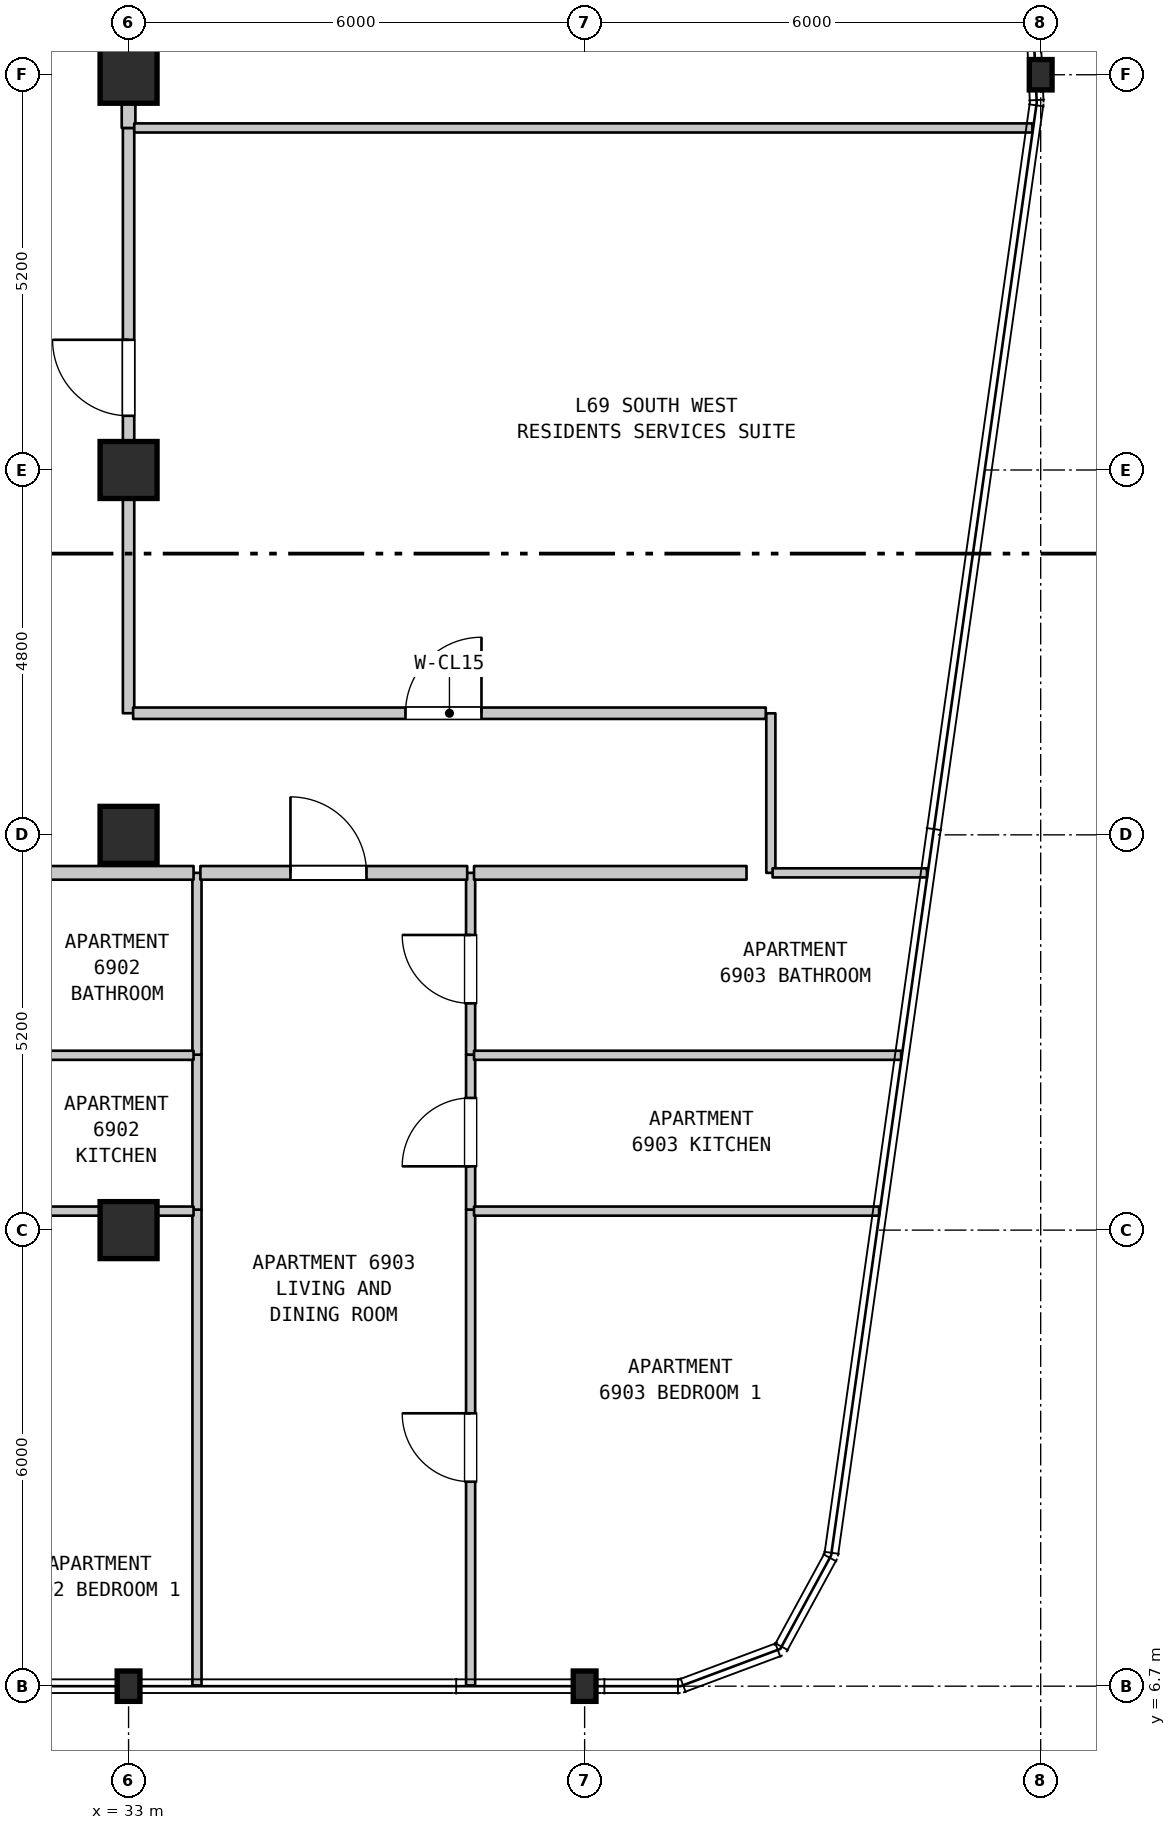
"""IFC4 building model, lengths in metres.
Left out: names, types, materials, properties, quantities, classifications, styles, units other than length and angle.
Written with IfcOpenShell. Run it as: python <this file> out.ifc"""

import sys

from ifc_helpers import new_model, si_unit, direction, frame, frame_2d, origin, origin_2d, place, context, subcontext, project, spatial, rectangle, i_section, extrude, element, fill, save


model = new_model("IFC4")
c1 = context("Model", 3, precision=1e-05, world=origin(), true_north=direction((0.0, 1.0)))
c2 = subcontext(c1, "Body", "Model", "MODEL_VIEW")
j1 = project(units=[si_unit("LENGTHUNIT", "METRE"), si_unit("PLANEANGLEUNIT", "RADIAN")], contexts=[c1])
p1 = place(None, origin())
s1 = spatial("IfcSite", under=j1, at=p1, CompositionType="ELEMENT")
p2 = place(p1, origin())
s2 = spatial("IfcBuilding", under=s1, at=p2, CompositionType="ELEMENT")
p3 = place(p2, frame((0.0, 0.0, 276.9)))
s3 = spatial("IfcBuildingStorey", under=s2, at=p3, CompositionType="ELEMENT", Elevation=276.9)
p4 = place(p3, frame((33.0, 6.7, 0.0), z_axis=(0.0, 0.0, 1.0), x_axis=(1.0, 0.0, 0.0)))
e1 = element("IfcColumn", 1, at=p4, inside=s3, PredefinedType="COLUMN", context=c2, shape_type="SweptSolid", body=[
    extrude(i_section(OverallWidth=0.3, OverallDepth=0.4, WebThickness=0.013, FlangeThickness=0.024, FilletRadius=0.027, at=origin_2d()), origin(), (0.0, 0.0, 1.0), 3.7),
])
for number, where, z_axis, x_axis in (
    (2, (33.0, 12.7, 0.0), (0.0, 0.0, 1.0), (1.0, 0.0, 0.0)),
    (3, (33.0, 17.9, 0.0), (0.0, 0.0, 1.0), (1.0, 0.0, 0.0)),
    (4, (33.0, 22.7, 0.0), (0.0, 0.0, 1.0), (1.0, 0.0, 0.0)),
    (5, (33.0, 27.9, 0.0), (0.0, 0.0, 1.0), (1.0, 0.0, 0.0)),
):
    element("IfcColumn", number, at=place(p3, frame(where, z_axis=z_axis, x_axis=x_axis)), inside=s3, PredefinedType="COLUMN", context=c2, shape_type="SweptSolid", body=[
        extrude(rectangle(XDim=0.75, YDim=0.75, at=origin_2d()), origin(), (0.0, 0.0, 1.0), 3.7),
    ])
for number, where, z_axis, x_axis in (
    (6, (39.0, 6.7, 0.0), (0.0, 0.0, 1.0), (1.0, 0.0, 0.0)),
    (7, (45.0, 27.9, 0.0), (0.0, 0.0, 1.0), (1.0, 0.0, 0.0)),
):
    element("IfcColumn", number, at=place(p3, frame(where, z_axis=z_axis, x_axis=x_axis)), inside=s3, PredefinedType="COLUMN", context=c2, shape_type="SweptSolid", body=[
        extrude(i_section(OverallWidth=0.3, OverallDepth=0.4, WebThickness=0.013, FlangeThickness=0.024, FilletRadius=0.027, at=origin_2d()), origin(), (0.0, 0.0, 1.0), 3.7),
    ])
p5 = place(p3, frame((33.0, 19.5, 0.0), z_axis=(0.0, 0.0, 1.0), x_axis=(0.0, 1.0, 0.0)))
e8 = element("IfcWall", 8, at=p5, inside=s3, PredefinedType="STANDARD", context=c2, shape_type="SweptSolid", body=[
    extrude(rectangle(XDim=7.7, YDim=0.15, at=frame_2d((3.85, 0.0))), origin(), (0.0, 0.0, 1.0), 3.1),
])
p6 = place(p5, frame((3.913, 0.0, 0.0)))
e9 = element("IfcOpeningElement", 9, at=p6, cuts=e8, PredefinedType="OPENING", context=c2, shape_type="SweptSolid", body=[
    extrude(rectangle(XDim=1.0, YDim=2.15, at=frame_2d((0.5, 1.075))), frame((0.0, 0.085, 0.0), z_axis=(0.0, -1.0, 0.0), x_axis=(1.0, 0.0, 0.0)), (0.0, 0.0, 1.0), 0.17),
])
p7 = place(p3, frame((33.0, 27.2, 0.0), z_axis=(0.0, 0.0, 1.0), x_axis=(0.0, 1.0, 0.0)))
e10 = element("IfcWall", 10, at=p7, inside=s3, PredefinedType="STANDARD", context=c2, shape_type="SweptSolid", body=[
    extrude(rectangle(XDim=0.7, YDim=0.18, at=frame_2d((0.35, 0.0))), origin(), (0.0, 0.0, 1.0), 3.1),
])
p8 = place(p3, frame((33.9, 6.71, 0.0), z_axis=(0.0, 0.0, 1.0), x_axis=(0.0, 1.0, 0.0)))
e11 = element("IfcWall", 11, at=p8, inside=s3, PredefinedType="PARTITIONING", context=c2, shape_type="SweptSolid", body=[
    extrude(rectangle(XDim=6.26, YDim=0.12, at=frame_2d((3.13, 0.0))), origin(), (0.0, 0.0, 1.0), 3.39),
])
p9 = place(p3, frame((33.9, 12.97, 0.0), z_axis=(0.0, 0.0, 1.0), x_axis=(0.0, 1.0, 0.0)))
e12 = element("IfcWall", 12, at=p9, inside=s3, PredefinedType="PARTITIONING", context=c2, shape_type="SweptSolid", body=[
    extrude(rectangle(XDim=2.038, YDim=0.12, at=frame_2d((1.019, 0.0))), origin(), (0.0, 0.0, 1.0), 3.39),
])
p10 = place(p3, frame((33.9, 15.008, 0.0), z_axis=(0.0, 0.0, 1.0), x_axis=(0.0, 1.0, 0.0)))
e13 = element("IfcWall", 13, at=p10, inside=s3, PredefinedType="PARTITIONING", context=c2, shape_type="SweptSolid", body=[
    extrude(rectangle(XDim=2.392, YDim=0.12, at=frame_2d((1.196, 0.0))), origin(), (0.0, 0.0, 1.0), 3.39),
])
p11 = place(p3, frame((37.5, 6.71, 0.0), z_axis=(0.0, 0.0, 1.0), x_axis=(0.0, 1.0, 0.0)))
e14 = element("IfcWall", 14, at=p11, inside=s3, PredefinedType="PARTITIONING", context=c2, shape_type="SweptSolid", body=[
    extrude(rectangle(XDim=6.26, YDim=0.12, at=frame_2d((3.13, 0.0))), origin(), (0.0, 0.0, 1.0), 3.39),
])
p12 = place(p11, frame((2.68, 0.0, 0.0)))
e15 = element("IfcOpeningElement", 15, at=p12, cuts=e14, PredefinedType="OPENING", context=c2, shape_type="SweptSolid", body=[
    extrude(rectangle(XDim=0.9, YDim=2.15, at=frame_2d((0.45, 1.075))), frame((0.0, 0.07, 0.0), z_axis=(0.0, -1.0, 0.0), x_axis=(1.0, 0.0, 0.0)), (0.0, 0.0, 1.0), 0.14),
])
p13 = place(p3, frame((37.5, 12.97, 0.0), z_axis=(0.0, 0.0, 1.0), x_axis=(0.0, 1.0, 0.0)))
e16 = element("IfcWall", 16, at=p13, inside=s3, PredefinedType="PARTITIONING", context=c2, shape_type="SweptSolid", body=[
    extrude(rectangle(XDim=2.038, YDim=0.12, at=frame_2d((1.019, 0.0))), origin(), (0.0, 0.0, 1.0), 3.39),
])
p14 = place(p13, frame((0.569, 0.0, 0.0)))
e17 = element("IfcOpeningElement", 17, at=p14, cuts=e16, PredefinedType="OPENING", context=c2, shape_type="SweptSolid", body=[
    extrude(rectangle(XDim=0.9, YDim=2.15, at=frame_2d((0.45, 1.075))), frame((0.0, 0.07, 0.0), z_axis=(0.0, -1.0, 0.0), x_axis=(1.0, 0.0, 0.0)), (0.0, 0.0, 1.0), 0.14),
])
p15 = place(p3, frame((37.5, 15.008, 0.0), z_axis=(0.0, 0.0, 1.0), x_axis=(0.0, 1.0, 0.0)))
e18 = element("IfcWall", 18, at=p15, inside=s3, PredefinedType="PARTITIONING", context=c2, shape_type="SweptSolid", body=[
    extrude(rectangle(XDim=2.392, YDim=0.12, at=frame_2d((1.196, 0.0))), origin(), (0.0, 0.0, 1.0), 3.39),
])
p16 = place(p15, frame((0.675, 0.0, 0.0)))
e19 = element("IfcOpeningElement", 19, at=p16, cuts=e18, PredefinedType="OPENING", context=c2, shape_type="SweptSolid", body=[
    extrude(rectangle(XDim=0.9, YDim=2.1, at=frame_2d((0.45, 1.05))), frame((0.0, 0.07, 0.0), z_axis=(0.0, -1.0, 0.0), x_axis=(1.0, 0.0, 0.0)), (0.0, 0.0, 1.0), 0.14),
])
p17 = place(p3, frame((41.45, 17.4, 0.0), z_axis=(0.0, 0.0, 1.0), x_axis=(0.0, 1.0, 0.0)))
e20 = element("IfcWall", 20, at=p17, inside=s3, PredefinedType="PARTITIONING", context=c2, shape_type="SweptSolid", body=[
    extrude(rectangle(XDim=2.099, YDim=0.12, at=frame_2d((1.05, 0.0))), origin(), (0.0, 0.0, 1.0), 3.39),
])
p18 = place(p3, frame((31.245, 12.95, 0.0), z_axis=(0.0, 0.0, 1.0), x_axis=(1.0, 0.0, 0.0)))
e21 = element("IfcWall", 21, at=p18, inside=s3, PredefinedType="PARTITIONING", context=c2, shape_type="SweptSolid", body=[
    extrude(rectangle(XDim=2.61, YDim=0.12, at=frame_2d((1.305, 0.0))), origin(), (0.0, 0.0, 1.0), 3.39),
])
p19 = place(p3, frame((37.545, 12.95, 0.0), z_axis=(0.0, 0.0, 1.0), x_axis=(1.0, 0.0, 0.0)))
e22 = element("IfcWall", 22, at=p19, inside=s3, PredefinedType="PARTITIONING", context=c2, shape_type="SweptSolid", body=[
    extrude(rectangle(XDim=5.329, YDim=0.12, at=frame_2d((2.665, 0.0))), origin(), (0.0, 0.0, 1.0), 3.39),
])
p20 = place(p3, frame((31.245, 15.0, 0.0), z_axis=(0.0, 0.0, 1.0), x_axis=(1.0, 0.0, 0.0)))
e23 = element("IfcWall", 23, at=p20, inside=s3, PredefinedType="PARTITIONING", context=c2, shape_type="SweptSolid", body=[
    extrude(rectangle(XDim=2.61, YDim=0.12, at=frame_2d((1.305, 0.0))), origin(), (0.0, 0.0, 1.0), 3.39),
])
p21 = place(p3, frame((37.545, 15.0, 0.0), z_axis=(0.0, 0.0, 1.0), x_axis=(1.0, 0.0, 0.0)))
e24 = element("IfcWall", 24, at=p21, inside=s3, PredefinedType="PARTITIONING", context=c2, shape_type="SweptSolid", body=[
    extrude(rectangle(XDim=5.619, YDim=0.12, at=frame_2d((2.81, 0.0))), origin(), (0.0, 0.0, 1.0), 3.39),
])
p22 = place(p3, frame((31.245, 17.4, 0.0), z_axis=(0.0, 0.0, 1.0), x_axis=(1.0, 0.0, 0.0)))
e25 = element("IfcWall", 25, at=p22, inside=s3, PredefinedType="STANDARD", context=c2, shape_type="SweptSolid", body=[
    extrude(rectangle(XDim=2.61, YDim=0.18, at=frame_2d((1.305, 0.0))), origin(), (0.0, 0.0, 1.0), 3.39),
])
p23 = place(p3, frame((33.945, 17.4, 0.0), z_axis=(0.0, 0.0, 1.0), x_axis=(1.0, 0.0, 0.0)))
e26 = element("IfcWall", 26, at=p23, inside=s3, PredefinedType="STANDARD", context=c2, shape_type="SweptSolid", body=[
    extrude(rectangle(XDim=3.51, YDim=0.18, at=frame_2d((1.755, 0.0))), origin(), (0.0, 0.0, 1.0), 3.39),
])
p24 = place(p23, frame((1.185, 0.0, 0.0)))
e27 = element("IfcOpeningElement", 27, at=p24, cuts=e26, PredefinedType="OPENING", context=c2, shape_type="SweptSolid", body=[
    extrude(rectangle(XDim=1.0, YDim=2.15, at=frame_2d((0.5, 1.075))), frame((0.0, 0.1, 0.0), z_axis=(0.0, -1.0, 0.0), x_axis=(1.0, 0.0, 0.0)), (0.0, 0.0, 1.0), 0.2),
])
p25 = place(p3, frame((37.545, 17.4, 0.0), z_axis=(0.0, 0.0, 1.0), x_axis=(1.0, 0.0, 0.0)))
e28 = element("IfcWall", 28, at=p25, inside=s3, PredefinedType="STANDARD", context=c2, shape_type="SweptSolid", body=[
    extrude(rectangle(XDim=3.585, YDim=0.18, at=frame_2d((1.792, 0.0))), origin(), (0.0, 0.0, 1.0), 3.39),
])
p26 = place(p3, frame((41.473, 17.4, 0.0), z_axis=(0.0, 0.0, 1.0), x_axis=(1.0, 0.0, 0.0)))
e29 = element("IfcWall", 29, at=p26, inside=s3, PredefinedType="PARTITIONING", context=c2, shape_type="SweptSolid", body=[
    extrude(rectangle(XDim=2.031, YDim=0.12, at=frame_2d((1.016, 0.0))), origin(), (0.0, 0.0, 1.0), 3.39),
])
p27 = place(p3, frame((33.06, 19.5, 0.0), z_axis=(0.0, 0.0, 1.0), x_axis=(1.0, 0.0, 0.0)))
e30 = element("IfcWall", 30, at=p27, inside=s3, PredefinedType="STANDARD", context=c2, shape_type="SweptSolid", body=[
    extrude(rectangle(XDim=8.323, YDim=0.15, at=frame_2d((4.162, 0.0))), origin(), (0.0, 0.0, 1.0), 3.39),
])
p28 = place(p27, frame((3.583, 0.0, 0.0)))
e31 = element("IfcOpeningElement", 31, at=p28, cuts=e30, PredefinedType="OPENING", context=c2, shape_type="SweptSolid", body=[
    extrude(rectangle(XDim=1.0, YDim=2.15, at=frame_2d((0.5, 1.075))), frame((0.0, 0.085, 0.0), z_axis=(0.0, -1.0, 0.0), x_axis=(1.0, 0.0, 0.0)), (0.0, 0.0, 1.0), 0.17),
])
p29 = place(p3, frame((33.075, 27.2, 0.0), z_axis=(0.0, 0.0, 1.0), x_axis=(1.0, 0.0, 0.0)))
e32 = element("IfcWall", 32, at=p29, inside=s3, PredefinedType="PARTITIONING", context=c2, shape_type="SweptSolid", body=[
    extrude(rectangle(XDim=11.816, YDim=0.12, at=frame_2d((5.908, 0.0))), origin(), (0.0, 0.0, 1.0), 3.39),
])
p30 = place(p3, frame((33.0, 27.9, 0.0), z_axis=(0.0, 0.0, 1.0), x_axis=(0.0, 1.0, 0.0)))
e33 = element("IfcWall", 33, at=p30, inside=s3, PredefinedType="STANDARD", context=c2, shape_type="SweptSolid", body=[
    extrude(rectangle(XDim=2.7, YDim=0.18, at=frame_2d((1.35, 0.0))), origin(), (0.0, 0.0, 1.0), 2.89),
])
p31 = place(p30, frame((0.718, 0.0, 0.0)))
e34 = element("IfcOpeningElement", 34, at=p31, cuts=e33, PredefinedType="OPENING", context=c2, shape_type="SweptSolid", body=[
    extrude(rectangle(XDim=1.0, YDim=2.15, at=frame_2d((0.5, 1.075))), frame((0.0, 0.1, 0.0), z_axis=(0.0, -1.0, 0.0), x_axis=(1.0, 0.0, 0.0)), (0.0, 0.0, 1.0), 0.2),
])
p32 = place(p6, origin())
e35 = element("IfcDoor", 35, at=p32, inside=s3, OperationType="SINGLE_SWING_RIGHT", PredefinedType="DOOR", context=c2, shape_type="SweptSolid", body=[
    extrude(rectangle(XDim=1.0, YDim=2.15, at=frame_2d((0.5, 1.075))), frame((0.0, 0.025, 0.0), z_axis=(0.0, -1.0, 0.0), x_axis=(1.0, 0.0, 0.0)), (0.0, 0.0, 1.0), 0.05),
])
fill(e9, e35)
p33 = place(p12, origin())
e36 = element("IfcDoor", 36, at=p33, inside=s3, OperationType="SINGLE_SWING_RIGHT", PredefinedType="DOOR", context=c2, shape_type="SweptSolid", body=[
    extrude(rectangle(XDim=0.9, YDim=2.15, at=frame_2d((0.45, 1.075))), frame((0.0, 0.025, 0.0), z_axis=(0.0, -1.0, 0.0), x_axis=(1.0, 0.0, 0.0)), (0.0, 0.0, 1.0), 0.05),
])
fill(e15, e36)
p34 = place(p14, origin())
e37 = element("IfcDoor", 37, at=p34, inside=s3, OperationType="SINGLE_SWING_LEFT", PredefinedType="DOOR", context=c2, shape_type="SweptSolid", body=[
    extrude(rectangle(XDim=0.9, YDim=2.15, at=frame_2d((0.45, 1.075))), frame((0.0, 0.025, 0.0), z_axis=(0.0, -1.0, 0.0), x_axis=(1.0, 0.0, 0.0)), (0.0, 0.0, 1.0), 0.05),
])
fill(e17, e37)
p35 = place(p16, origin())
e38 = element("IfcDoor", 38, at=p35, inside=s3, OperationType="SINGLE_SWING_RIGHT", PredefinedType="DOOR", context=c2, shape_type="SweptSolid", body=[
    extrude(rectangle(XDim=0.9, YDim=2.1, at=frame_2d((0.45, 1.05))), frame((0.0, 0.025, 0.0), z_axis=(0.0, -1.0, 0.0), x_axis=(1.0, 0.0, 0.0)), (0.0, 0.0, 1.0), 0.05),
])
fill(e19, e38)
p36 = place(p24, origin())
e39 = element("IfcDoor", 39, at=p36, inside=s3, OperationType="SINGLE_SWING_LEFT", PredefinedType="DOOR", context=c2, shape_type="SweptSolid", body=[
    extrude(rectangle(XDim=1.0, YDim=2.15, at=frame_2d((0.5, 1.075))), frame((0.0, 0.025, 0.0), z_axis=(0.0, -1.0, 0.0), x_axis=(1.0, 0.0, 0.0)), (0.0, 0.0, 1.0), 0.05),
])
fill(e27, e39)
p37 = place(p28, origin())
e40 = element("IfcDoor", 40, at=p37, inside=s3, OperationType="SINGLE_SWING_RIGHT", PredefinedType="DOOR", context=c2, shape_type="SweptSolid", body=[
    extrude(rectangle(XDim=1.0, YDim=2.15, at=frame_2d((0.5, 1.075))), frame((0.0, 0.025, 0.0), z_axis=(0.0, -1.0, 0.0), x_axis=(1.0, 0.0, 0.0)), (0.0, 0.0, 1.0), 0.05),
])
fill(e31, e40)
save(model, sys.argv[1])
